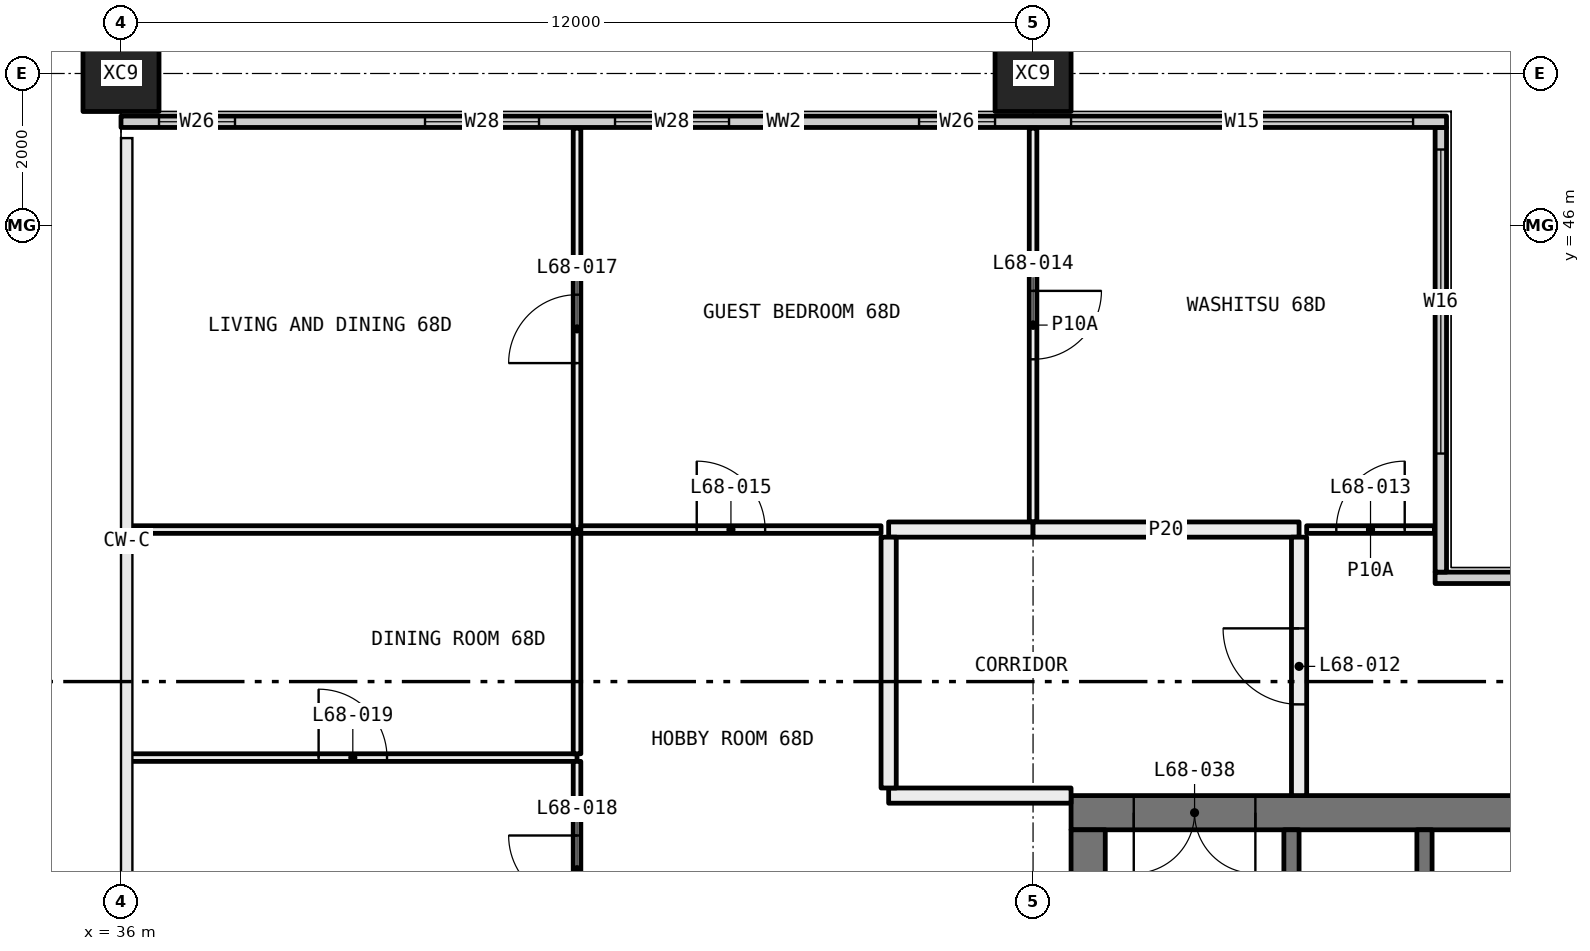
"""IFC4 building model, lengths in metres.
Left out: names, types, materials, properties, quantities, classifications, styles, units other than length and angle.
Written with IfcOpenShell. Run it as: python <this file> out.ifc"""

import sys

from ifc_helpers import new_model, si_unit, direction, frame, frame_2d, origin, origin_2d, place, context, subcontext, project, spatial, rectangle, hollow_rectangle, extrude, element, fill, save


model = new_model("IFC4")
c1 = context("Model", 3, precision=1e-05, world=origin(), true_north=direction((0.0, 1.0)))
c2 = subcontext(c1, "Body", "Model", "MODEL_VIEW")
j1 = project(units=[si_unit("LENGTHUNIT", "METRE"), si_unit("PLANEANGLEUNIT", "RADIAN")], contexts=[c1])
p1 = place(None, origin())
s1 = spatial("IfcSite", under=j1, at=p1, CompositionType="ELEMENT")
p2 = place(p1, origin())
s2 = spatial("IfcBuilding", under=s1, at=p2, CompositionType="ELEMENT")
p3 = place(p2, frame((0.0, 0.0, 252.45)))
s3 = spatial("IfcBuildingStorey", under=s2, at=p3, CompositionType="ELEMENT", Elevation=252.45)
for number, where, z_axis, x_axis in (
    (1, (36.0, 48.0, -0.4), (0.0, 0.0, 1.0), (1.0, 0.0, 0.0)),
    (2, (48.0, 48.0, -0.4), (0.0, 0.0, 1.0), (1.0, 0.0, 0.0)),
):
    element("IfcColumn", number, at=place(p3, frame(where, z_axis=z_axis, x_axis=x_axis)), inside=s3, PredefinedType="COLUMN", context=c2, shape_type="SweptSolid", body=[
        extrude(hollow_rectangle(XDim=1.0, YDim=1.0, WallThickness=0.036, at=origin_2d()), origin(), (0.0, 0.0, 1.0), 3.45),
    ])
p4 = place(p3, frame((53.29, 41.365, 0.0), z_axis=(0.0, 0.0, 1.0), x_axis=(1.0, 0.0, 0.0)))
e3 = element("IfcWall", 3, at=p4, inside=s3, PredefinedType="ELEMENTEDWALL", context=c2, shape_type="SweptSolid", body=[
    extrude(rectangle(XDim=6.15, YDim=0.15, at=frame_2d((3.075, 0.0))), origin(), (0.0, 0.0, 1.0), 3.05),
])
p5 = place(p4, frame((1.71, 0.0, 0.45)))
e4 = element("IfcOpeningElement", 4, at=p5, cuts=e3, PredefinedType="OPENING", context=c2, shape_type="SweptSolid", body=[
    extrude(rectangle(XDim=4.0, YDim=2.55, at=frame_2d((2.0, 1.275))), frame((0.0, 0.085, 0.0), z_axis=(0.0, -1.0, 0.0), x_axis=(1.0, 0.0, 0.0)), (0.0, 0.0, 1.0), 0.17),
])
p6 = place(p3, frame((53.365, 41.44, 0.0), z_axis=(0.0, 0.0, 1.0), x_axis=(0.0, 1.0, 0.0)))
e5 = element("IfcWall", 5, at=p6, inside=s3, PredefinedType="ELEMENTEDWALL", context=c2, shape_type="SweptSolid", body=[
    extrude(rectangle(XDim=5.85, YDim=0.15, at=frame_2d((2.925, 0.0))), origin(), (0.0, 0.0, 1.0), 3.05),
])
p7 = place(p6, frame((1.56, 0.0, 0.45)))
e6 = element("IfcOpeningElement", 6, at=p7, cuts=e5, PredefinedType="OPENING", context=c2, shape_type="SweptSolid", body=[
    extrude(rectangle(XDim=4.0, YDim=2.55, at=frame_2d((2.0, 1.275))), frame((0.0, 0.085, 0.0), z_axis=(0.0, -1.0, 0.0), x_axis=(1.0, 0.0, 0.0)), (0.0, 0.0, 1.0), 0.17),
])
p8 = place(p3, frame((36.0, 47.365, 0.0), z_axis=(0.0, 0.0, 1.0), x_axis=(1.0, 0.0, 0.0)))
e7 = element("IfcWall", 7, at=p8, inside=s3, PredefinedType="ELEMENTEDWALL", context=c2, shape_type="SweptSolid", body=[
    extrude(rectangle(XDim=17.44, YDim=0.15, at=frame_2d((8.72, 0.0))), origin(), (0.0, 0.0, 1.0), 3.05),
])
p9 = place(p8, frame((0.5, 0.0, 0.45)))
e8 = element("IfcOpeningElement", 8, at=p9, cuts=e7, PredefinedType="OPENING", context=c2, shape_type="SweptSolid", body=[
    extrude(rectangle(XDim=1.0, YDim=2.55, at=frame_2d((0.5, 1.275))), frame((0.0, 0.085, 0.0), z_axis=(0.0, -1.0, 0.0), x_axis=(1.0, 0.0, 0.0)), (0.0, 0.0, 1.0), 0.17),
])
p10 = place(p8, frame((4.0, 0.0, 0.45)))
e9 = element("IfcOpeningElement", 9, at=p10, cuts=e7, PredefinedType="OPENING", context=c2, shape_type="SweptSolid", body=[
    extrude(rectangle(XDim=1.5, YDim=2.55, at=frame_2d((0.75, 1.275))), frame((0.0, 0.085, 0.0), z_axis=(0.0, -1.0, 0.0), x_axis=(1.0, 0.0, 0.0)), (0.0, 0.0, 1.0), 0.17),
])
p11 = place(p8, frame((6.5, 0.0, 0.45)))
e10 = element("IfcOpeningElement", 10, at=p11, cuts=e7, PredefinedType="OPENING", context=c2, shape_type="SweptSolid", body=[
    extrude(rectangle(XDim=1.5, YDim=2.55, at=frame_2d((0.75, 1.275))), frame((0.0, 0.085, 0.0), z_axis=(0.0, -1.0, 0.0), x_axis=(1.0, 0.0, 0.0)), (0.0, 0.0, 1.0), 0.17),
])
p12 = place(p8, frame((10.5, 0.0, 0.45)))
e11 = element("IfcOpeningElement", 11, at=p12, cuts=e7, PredefinedType="OPENING", context=c2, shape_type="SweptSolid", body=[
    extrude(rectangle(XDim=1.0, YDim=2.55, at=frame_2d((0.5, 1.275))), frame((0.0, 0.085, 0.0), z_axis=(0.0, -1.0, 0.0), x_axis=(1.0, 0.0, 0.0)), (0.0, 0.0, 1.0), 0.17),
])
p13 = place(p8, frame((12.5, 0.0, 0.45)))
e12 = element("IfcOpeningElement", 12, at=p13, cuts=e7, PredefinedType="OPENING", context=c2, shape_type="SweptSolid", body=[
    extrude(rectangle(XDim=4.5, YDim=2.55, at=frame_2d((2.25, 1.275))), frame((0.0, 0.085, 0.0), z_axis=(0.0, -1.0, 0.0), x_axis=(1.0, 0.0, 0.0)), (0.0, 0.0, 1.0), 0.17),
])
p14 = place(p3, frame((42.0, 42.0, 0.0), z_axis=(0.0, 0.0, 1.0), x_axis=(0.0, 1.0, 0.0)))
e13 = element("IfcWall", 13, at=p14, inside=s3, PredefinedType="PARTITIONING", context=c2, shape_type="SweptSolid", body=[
    extrude(rectangle(XDim=5.28, YDim=0.1, at=frame_2d((2.64, 0.0))), origin(), (0.0, 0.0, 1.0), 3.05),
])
p15 = place(p14, frame((2.19, 0.0, 0.0)))
e14 = element("IfcOpeningElement", 14, at=p15, cuts=e13, PredefinedType="OPENING", context=c2, shape_type="SweptSolid", body=[
    extrude(rectangle(XDim=0.9, YDim=2.1, at=frame_2d((0.45, 1.05))), frame((0.0, 0.06, 0.0), z_axis=(0.0, -1.0, 0.0), x_axis=(1.0, 0.0, 0.0)), (0.0, 0.0, 1.0), 0.12),
])
p16 = place(p3, frame((36.1, 42.0, 0.0), z_axis=(0.0, 0.0, 1.0), x_axis=(1.0, 0.0, 0.0)))
e15 = element("IfcWall", 15, at=p16, inside=s3, PredefinedType="PARTITIONING", context=c2, shape_type="SweptSolid", body=[
    extrude(rectangle(XDim=5.85, YDim=0.1, at=frame_2d((2.925, 0.0))), origin(), (0.0, 0.0, 1.0), 3.05),
])
p17 = place(p3, frame((48.0, 42.1, 0.0), z_axis=(0.0, 0.0, 1.0), x_axis=(0.0, 1.0, 0.0)))
e16 = element("IfcWall", 16, at=p17, inside=s3, PredefinedType="PARTITIONING", context=c2, shape_type="SweptSolid", body=[
    extrude(rectangle(XDim=5.18, YDim=0.1, at=frame_2d((2.59, 0.0))), origin(), (0.0, 0.0, 1.0), 3.05),
])
p18 = place(p17, frame((2.14, 0.0, 0.0)))
e17 = element("IfcOpeningElement", 17, at=p18, cuts=e16, PredefinedType="OPENING", context=c2, shape_type="SweptSolid", body=[
    extrude(rectangle(XDim=0.9, YDim=2.1, at=frame_2d((0.45, 1.05))), frame((0.0, 0.06, 0.0), z_axis=(0.0, -1.0, 0.0), x_axis=(1.0, 0.0, 0.0)), (0.0, 0.0, 1.0), 0.12),
])
p19 = place(p3, frame((42.05, 42.0, 0.0), z_axis=(0.0, 0.0, 1.0), x_axis=(1.0, 0.0, 0.0)))
e18 = element("IfcWall", 18, at=p19, inside=s3, PredefinedType="PARTITIONING", context=c2, shape_type="SweptSolid", body=[
    extrude(rectangle(XDim=3.95, YDim=0.1, at=frame_2d((1.975, 0.0))), origin(), (0.0, 0.0, 1.0), 3.05),
])
p20 = place(p19, frame((1.525, 0.0, 0.0)))
e19 = element("IfcOpeningElement", 19, at=p20, cuts=e18, PredefinedType="OPENING", context=c2, shape_type="SweptSolid", body=[
    extrude(rectangle(XDim=0.9, YDim=2.1, at=frame_2d((0.45, 1.05))), frame((0.0, 0.06, 0.0), z_axis=(0.0, -1.0, 0.0), x_axis=(1.0, 0.0, 0.0)), (0.0, 0.0, 1.0), 0.12),
])
p21 = place(p3, frame((46.1, 42.0, 0.0), z_axis=(0.0, 0.0, 1.0), x_axis=(1.0, 0.0, 0.0)))
e20 = element("IfcWall", 20, at=p21, inside=s3, PredefinedType="PARTITIONING", context=c2, shape_type="SweptSolid", body=[
    extrude(rectangle(XDim=1.9, YDim=0.2, at=frame_2d((0.95, 0.0))), origin(), (0.0, 0.0, 1.0), 3.05),
])
p22 = place(p3, frame((51.6, 42.0, 0.0), z_axis=(0.0, 0.0, 1.0), x_axis=(1.0, 0.0, 0.0)))
e21 = element("IfcWall", 21, at=p22, inside=s3, PredefinedType="PARTITIONING", context=c2, shape_type="SweptSolid", body=[
    extrude(rectangle(XDim=1.68, YDim=0.1, at=frame_2d((0.84, 0.0))), origin(), (0.0, 0.0, 1.0), 3.05),
])
p23 = place(p22, frame((0.39, 0.0, 0.0)))
e22 = element("IfcOpeningElement", 22, at=p23, cuts=e21, PredefinedType="OPENING", context=c2, shape_type="SweptSolid", body=[
    extrude(rectangle(XDim=0.9, YDim=2.1, at=frame_2d((0.45, 1.05))), frame((0.0, 0.06, 0.0), z_axis=(0.0, -1.0, 0.0), x_axis=(1.0, 0.0, 0.0)), (0.0, 0.0, 1.0), 0.12),
])
p24 = place(p3, frame((48.0, 42.0, 0.0), z_axis=(0.0, 0.0, 1.0), x_axis=(1.0, 0.0, 0.0)))
e23 = element("IfcWall", 23, at=p24, inside=s3, PredefinedType="PARTITIONING", context=c2, shape_type="SweptSolid", body=[
    extrude(rectangle(XDim=3.5, YDim=0.2, at=frame_2d((1.75, 0.0))), origin(), (0.0, 0.0, 1.0), 3.05),
])
p25 = place(p3, frame((51.5, 41.9, 0.0), z_axis=(0.0, 0.0, 1.0), x_axis=(0.0, -1.0, 0.0)))
e24 = element("IfcWall", 24, at=p25, inside=s3, PredefinedType="PARTITIONING", context=c2, shape_type="SweptSolid", body=[
    extrude(rectangle(XDim=3.4, YDim=0.2, at=frame_2d((1.7, 0.0))), origin(), (0.0, 0.0, 1.0), 3.05),
])
p26 = place(p25, frame((1.2, 0.0, 0.0)))
e25 = element("IfcOpeningElement", 25, at=p26, cuts=e24, PredefinedType="OPENING", context=c2, shape_type="SweptSolid", body=[
    extrude(rectangle(XDim=1.0, YDim=2.1, at=frame_2d((0.5, 1.05))), frame((0.0, 0.11, 0.0), z_axis=(0.0, -1.0, 0.0), x_axis=(1.0, 0.0, 0.0)), (0.0, 0.0, 1.0), 0.22),
])
p27 = place(p3, frame((42.0, 39.0, 0.0), z_axis=(0.0, 0.0, 1.0), x_axis=(-1.0, 0.0, 0.0)))
e26 = element("IfcWall", 26, at=p27, inside=s3, PredefinedType="PARTITIONING", context=c2, shape_type="SweptSolid", body=[
    extrude(rectangle(XDim=5.9, YDim=0.1, at=frame_2d((2.95, 0.0))), origin(), (0.0, 0.0, 1.0), 3.05),
])
p28 = place(p27, frame((2.5, 0.0, 0.0)))
e27 = element("IfcOpeningElement", 27, at=p28, cuts=e26, PredefinedType="OPENING", context=c2, shape_type="SweptSolid", body=[
    extrude(rectangle(XDim=0.9, YDim=2.1, at=frame_2d((0.45, 1.05))), frame((0.0, 0.06, 0.0), z_axis=(0.0, -1.0, 0.0), x_axis=(1.0, 0.0, 0.0)), (0.0, 0.0, 1.0), 0.12),
])
p29 = place(p3, frame((42.0, 36.1, 0.0), z_axis=(0.0, 0.0, 1.0), x_axis=(0.0, 1.0, 0.0)))
e28 = element("IfcWall", 28, at=p29, inside=s3, PredefinedType="PARTITIONING", context=c2, shape_type="SweptSolid", body=[
    extrude(rectangle(XDim=2.85, YDim=0.1, at=frame_2d((1.425, 0.0))), origin(), (0.0, 0.0, 1.0), 3.05),
])
p30 = place(p29, frame((0.975, 0.0, 0.0)))
e29 = element("IfcOpeningElement", 29, at=p30, cuts=e28, PredefinedType="OPENING", context=c2, shape_type="SweptSolid", body=[
    extrude(rectangle(XDim=0.9, YDim=2.1, at=frame_2d((0.45, 1.05))), frame((0.0, 0.06, 0.0), z_axis=(0.0, -1.0, 0.0), x_axis=(1.0, 0.0, 0.0)), (0.0, 0.0, 1.0), 0.12),
])
p31 = place(p3, frame((42.0, 39.05, 0.0), z_axis=(0.0, 0.0, 1.0), x_axis=(0.0, 1.0, 0.0)))
e30 = element("IfcWall", 30, at=p31, inside=s3, PredefinedType="PARTITIONING", context=c2, shape_type="SweptSolid", body=[
    extrude(rectangle(XDim=2.9, YDim=0.1, at=frame_2d((1.45, 0.0))), origin(), (0.0, 0.0, 1.0), 3.05),
])
p32 = place(p3, frame((48.5, 38.5, 0.0), z_axis=(0.0, 0.0, 1.0), x_axis=(-1.0, 0.0, 0.0)))
e31 = element("IfcWall", 31, at=p32, inside=s3, PredefinedType="PARTITIONING", context=c2, shape_type="SweptSolid", body=[
    extrude(rectangle(XDim=2.4, YDim=0.2, at=frame_2d((1.2, 0.0))), origin(), (0.0, 0.0, 1.0), 3.05),
])
p33 = place(p3, frame((46.1, 38.6, 0.0), z_axis=(0.0, 0.0, 1.0), x_axis=(0.0, 1.0, 0.0)))
e32 = element("IfcWall", 32, at=p33, inside=s3, PredefinedType="PARTITIONING", context=c2, shape_type="SweptSolid", body=[
    extrude(rectangle(XDim=3.3, YDim=0.2, at=frame_2d((1.65, 0.0))), origin(), (0.0, 0.0, 1.0), 3.05),
])
p34 = place(p3, frame((59.5, 38.275, 0.0), z_axis=(0.0, 0.0, 1.0), x_axis=(-1.0, 0.0, 0.0)))
e33 = element("IfcWall", 33, at=p34, inside=s3, PredefinedType="SHEAR", context=c2, shape_type="SweptSolid", body=[
    extrude(rectangle(XDim=11.0, YDim=0.45, at=frame_2d((5.5, 0.0))), origin(), (0.0, 0.0, 1.0), 3.05),
])
p35 = place(p34, frame((8.575, 0.0, 0.0)))
e34 = element("IfcOpeningElement", 34, at=p35, cuts=e33, PredefinedType="OPENING", context=c2, shape_type="SweptSolid", body=[
    extrude(rectangle(XDim=1.6, YDim=2.1, at=frame_2d((0.8, 1.05))), frame((0.0, 0.235, 0.0), z_axis=(0.0, -1.0, 0.0), x_axis=(1.0, 0.0, 0.0)), (0.0, 0.0, 1.0), 0.47),
])
p36 = place(p3, frame((48.725, 21.95, 0.0), z_axis=(0.0, 0.0, 1.0), x_axis=(0.0, 1.0, 0.0)))
e35 = element("IfcWall", 35, at=p36, inside=s3, PredefinedType="SHEAR", context=c2, shape_type="SweptSolid", body=[
    extrude(rectangle(XDim=16.1, YDim=0.45, at=frame_2d((8.05, 0.0))), origin(), (0.0, 0.0, 1.0), 3.05),
])
p37 = place(p36, frame((7.25, 0.0, 0.0)))
e36 = element("IfcOpeningElement", 36, at=p37, cuts=e35, PredefinedType="OPENING", context=c2, shape_type="SweptSolid", body=[
    extrude(rectangle(XDim=1.6, YDim=2.1, at=frame_2d((0.8, 1.05))), frame((0.0, 0.235, 0.0), z_axis=(0.0, -1.0, 0.0), x_axis=(1.0, 0.0, 0.0)), (0.0, 0.0, 1.0), 0.47),
])
p38 = place(p3, frame((51.4, 25.1, 0.0), z_axis=(0.0, 0.0, 1.0), x_axis=(0.0, 1.0, 0.0)))
e37 = element("IfcWall", 37, at=p38, inside=s3, PredefinedType="SOLIDWALL", context=c2, shape_type="SweptSolid", body=[
    extrude(rectangle(XDim=12.95, YDim=0.2, at=frame_2d((6.475, 0.0))), origin(), (0.0, 0.0, 1.0), 3.05),
])
p39 = place(p38, frame((0.6, 0.0, 0.0)))
e38 = element("IfcOpeningElement", 38, at=p39, cuts=e37, PredefinedType="OPENING", context=c2, shape_type="SweptSolid", body=[
    extrude(rectangle(XDim=1.1, YDim=2.1, at=frame_2d((0.55, 1.05))), frame((0.0, 0.11, 0.0), z_axis=(0.0, -1.0, 0.0), x_axis=(1.0, 0.0, 0.0)), (0.0, 0.0, 1.0), 0.22),
])
p40 = place(p38, frame((3.1, 0.0, 0.0)))
e39 = element("IfcOpeningElement", 39, at=p40, cuts=e37, PredefinedType="OPENING", context=c2, shape_type="SweptSolid", body=[
    extrude(rectangle(XDim=1.1, YDim=2.1, at=frame_2d((0.55, 1.05))), frame((0.0, 0.11, 0.0), z_axis=(0.0, -1.0, 0.0), x_axis=(1.0, 0.0, 0.0)), (0.0, 0.0, 1.0), 0.22),
])
p41 = place(p38, frame((5.6, 0.0, 0.0)))
e40 = element("IfcOpeningElement", 40, at=p41, cuts=e37, PredefinedType="OPENING", context=c2, shape_type="SweptSolid", body=[
    extrude(rectangle(XDim=1.1, YDim=2.1, at=frame_2d((0.55, 1.05))), frame((0.0, 0.11, 0.0), z_axis=(0.0, -1.0, 0.0), x_axis=(1.0, 0.0, 0.0)), (0.0, 0.0, 1.0), 0.22),
])
p42 = place(p38, frame((8.1, 0.0, 0.0)))
e41 = element("IfcOpeningElement", 41, at=p42, cuts=e37, PredefinedType="OPENING", context=c2, shape_type="SweptSolid", body=[
    extrude(rectangle(XDim=1.1, YDim=2.1, at=frame_2d((0.55, 1.05))), frame((0.0, 0.11, 0.0), z_axis=(0.0, -1.0, 0.0), x_axis=(1.0, 0.0, 0.0)), (0.0, 0.0, 1.0), 0.22),
])
p43 = place(p38, frame((10.975, 0.0, 0.0)))
e42 = element("IfcOpeningElement", 42, at=p43, cuts=e37, PredefinedType="OPENING", context=c2, shape_type="SweptSolid", body=[
    extrude(rectangle(XDim=1.0, YDim=2.1, at=frame_2d((0.5, 1.05))), frame((0.0, 0.11, 0.0), z_axis=(0.0, -1.0, 0.0), x_axis=(1.0, 0.0, 0.0)), (0.0, 0.0, 1.0), 0.22),
])
p44 = place(p3, frame((53.15, 35.1, 0.0), z_axis=(0.0, 0.0, 1.0), x_axis=(0.0, 1.0, 0.0)))
e43 = element("IfcWall", 43, at=p44, inside=s3, PredefinedType="SOLIDWALL", context=c2, shape_type="SweptSolid", body=[
    extrude(rectangle(XDim=2.95, YDim=0.2, at=frame_2d((1.475, 0.0))), origin(), (0.0, 0.0, 1.0), 3.05),
])
p45 = place(p44, frame((0.975, 0.0, 0.0)))
e44 = element("IfcOpeningElement", 44, at=p45, cuts=e43, PredefinedType="OPENING", context=c2, shape_type="SweptSolid", body=[
    extrude(rectangle(XDim=1.0, YDim=2.1, at=frame_2d((0.5, 1.05))), frame((0.0, 0.11, 0.0), z_axis=(0.0, -1.0, 0.0), x_axis=(1.0, 0.0, 0.0)), (0.0, 0.0, 1.0), 0.22),
])
p46 = place(p7, origin())
e45 = element("IfcWindow", 45, at=p46, inside=s3, PartitioningType="SINGLE_PANEL", PredefinedType="WINDOW", context=c2, shape_type="SweptSolid", body=[
    extrude(rectangle(XDim=4.0, YDim=2.55, at=frame_2d((2.0, 1.275))), frame((0.0, 0.03, 0.0), z_axis=(0.0, -1.0, 0.0), x_axis=(1.0, 0.0, 0.0)), (0.0, 0.0, 1.0), 0.06),
])
fill(e6, e45)
p47 = place(p9, origin())
e46 = element("IfcWindow", 46, at=p47, inside=s3, PartitioningType="SINGLE_PANEL", PredefinedType="WINDOW", context=c2, shape_type="SweptSolid", body=[
    extrude(rectangle(XDim=1.0, YDim=2.55, at=frame_2d((0.5, 1.275))), frame((0.0, 0.03, 0.0), z_axis=(0.0, -1.0, 0.0), x_axis=(1.0, 0.0, 0.0)), (0.0, 0.0, 1.0), 0.06),
])
fill(e8, e46)
p48 = place(p10, origin())
e47 = element("IfcWindow", 47, at=p48, inside=s3, PartitioningType="SINGLE_PANEL", PredefinedType="WINDOW", context=c2, shape_type="SweptSolid", body=[
    extrude(rectangle(XDim=1.5, YDim=2.55, at=frame_2d((0.75, 1.275))), frame((0.0, 0.03, 0.0), z_axis=(0.0, -1.0, 0.0), x_axis=(1.0, 0.0, 0.0)), (0.0, 0.0, 1.0), 0.06),
])
fill(e9, e47)
p49 = place(p11, origin())
e48 = element("IfcWindow", 48, at=p49, inside=s3, PartitioningType="SINGLE_PANEL", PredefinedType="WINDOW", context=c2, shape_type="SweptSolid", body=[
    extrude(rectangle(XDim=1.5, YDim=2.55, at=frame_2d((0.75, 1.275))), frame((0.0, 0.03, 0.0), z_axis=(0.0, -1.0, 0.0), x_axis=(1.0, 0.0, 0.0)), (0.0, 0.0, 1.0), 0.06),
])
fill(e10, e48)
p50 = place(p12, origin())
e49 = element("IfcWindow", 49, at=p50, inside=s3, PartitioningType="SINGLE_PANEL", PredefinedType="WINDOW", context=c2, shape_type="SweptSolid", body=[
    extrude(rectangle(XDim=1.0, YDim=2.55, at=frame_2d((0.5, 1.275))), frame((0.0, 0.03, 0.0), z_axis=(0.0, -1.0, 0.0), x_axis=(1.0, 0.0, 0.0)), (0.0, 0.0, 1.0), 0.06),
])
fill(e11, e49)
p51 = place(p13, origin())
e50 = element("IfcWindow", 50, at=p51, inside=s3, PartitioningType="SINGLE_PANEL", PredefinedType="WINDOW", context=c2, shape_type="SweptSolid", body=[
    extrude(rectangle(XDim=4.5, YDim=2.55, at=frame_2d((2.25, 1.275))), frame((0.0, 0.03, 0.0), z_axis=(0.0, -1.0, 0.0), x_axis=(1.0, 0.0, 0.0)), (0.0, 0.0, 1.0), 0.06),
])
fill(e12, e50)
p52 = place(p26, frame((1.0, 0.0, 0.0), x_axis=(-1.0, 0.0, 0.0)))
e51 = element("IfcDoor", 51, at=p52, inside=s3, OperationType="SINGLE_SWING_LEFT", PredefinedType="DOOR", context=c2, shape_type="SweptSolid", body=[
    extrude(rectangle(XDim=1.0, YDim=2.1, at=frame_2d((0.5, 1.05))), frame((0.0, 0.025, 0.0), z_axis=(0.0, -1.0, 0.0), x_axis=(1.0, 0.0, 0.0)), (0.0, 0.0, 1.0), 0.05),
])
fill(e25, e51)
p53 = place(p23, origin())
e52 = element("IfcDoor", 52, at=p53, inside=s3, OperationType="SINGLE_SWING_LEFT", PredefinedType="DOOR", context=c2, shape_type="SweptSolid", body=[
    extrude(rectangle(XDim=0.9, YDim=2.1, at=frame_2d((0.45, 1.05))), frame((0.0, 0.025, 0.0), z_axis=(0.0, -1.0, 0.0), x_axis=(1.0, 0.0, 0.0)), (0.0, 0.0, 1.0), 0.05),
])
fill(e22, e52)
p54 = place(p18, frame((0.9, 0.0, 0.0), x_axis=(-1.0, 0.0, 0.0)))
e53 = element("IfcDoor", 53, at=p54, inside=s3, OperationType="SINGLE_SWING_RIGHT", PredefinedType="DOOR", context=c2, shape_type="SweptSolid", body=[
    extrude(rectangle(XDim=0.9, YDim=2.1, at=frame_2d((0.45, 1.05))), frame((0.0, 0.025, 0.0), z_axis=(0.0, -1.0, 0.0), x_axis=(1.0, 0.0, 0.0)), (0.0, 0.0, 1.0), 0.05),
])
fill(e17, e53)
p55 = place(p20, origin())
e54 = element("IfcDoor", 54, at=p55, inside=s3, OperationType="SINGLE_SWING_RIGHT", PredefinedType="DOOR", context=c2, shape_type="SweptSolid", body=[
    extrude(rectangle(XDim=0.9, YDim=2.1, at=frame_2d((0.45, 1.05))), frame((0.0, 0.025, 0.0), z_axis=(0.0, -1.0, 0.0), x_axis=(1.0, 0.0, 0.0)), (0.0, 0.0, 1.0), 0.05),
])
fill(e19, e54)
p56 = place(p15, origin())
e55 = element("IfcDoor", 55, at=p56, inside=s3, OperationType="SINGLE_SWING_RIGHT", PredefinedType="DOOR", context=c2, shape_type="SweptSolid", body=[
    extrude(rectangle(XDim=0.9, YDim=2.1, at=frame_2d((0.45, 1.05))), frame((0.0, 0.025, 0.0), z_axis=(0.0, -1.0, 0.0), x_axis=(1.0, 0.0, 0.0)), (0.0, 0.0, 1.0), 0.05),
])
fill(e14, e55)
p57 = place(p30, origin())
e56 = element("IfcDoor", 56, at=p57, inside=s3, OperationType="SINGLE_SWING_LEFT", PredefinedType="DOOR", context=c2, shape_type="SweptSolid", body=[
    extrude(rectangle(XDim=0.9, YDim=2.1, at=frame_2d((0.45, 1.05))), frame((0.0, 0.025, 0.0), z_axis=(0.0, -1.0, 0.0), x_axis=(1.0, 0.0, 0.0)), (0.0, 0.0, 1.0), 0.05),
])
fill(e29, e56)
p58 = place(p28, frame((0.9, 0.0, 0.0), x_axis=(-1.0, 0.0, 0.0)))
e57 = element("IfcDoor", 57, at=p58, inside=s3, OperationType="SINGLE_SWING_RIGHT", PredefinedType="DOOR", context=c2, shape_type="SweptSolid", body=[
    extrude(rectangle(XDim=0.9, YDim=2.1, at=frame_2d((0.45, 1.05))), frame((0.0, 0.025, 0.0), z_axis=(0.0, -1.0, 0.0), x_axis=(1.0, 0.0, 0.0)), (0.0, 0.0, 1.0), 0.05),
])
fill(e27, e57)
p59 = place(p35, origin())
e58 = element("IfcDoor", 58, at=p59, inside=s3, OperationType="DOUBLE_DOOR_SINGLE_SWING", PredefinedType="DOOR", context=c2, shape_type="SweptSolid", body=[
    extrude(rectangle(XDim=1.6, YDim=2.1, at=frame_2d((0.8, 1.05))), frame((0.0, 0.025, 0.0), z_axis=(0.0, -1.0, 0.0), x_axis=(1.0, 0.0, 0.0)), (0.0, 0.0, 1.0), 0.05),
])
fill(e34, e58)
save(model, sys.argv[1])
